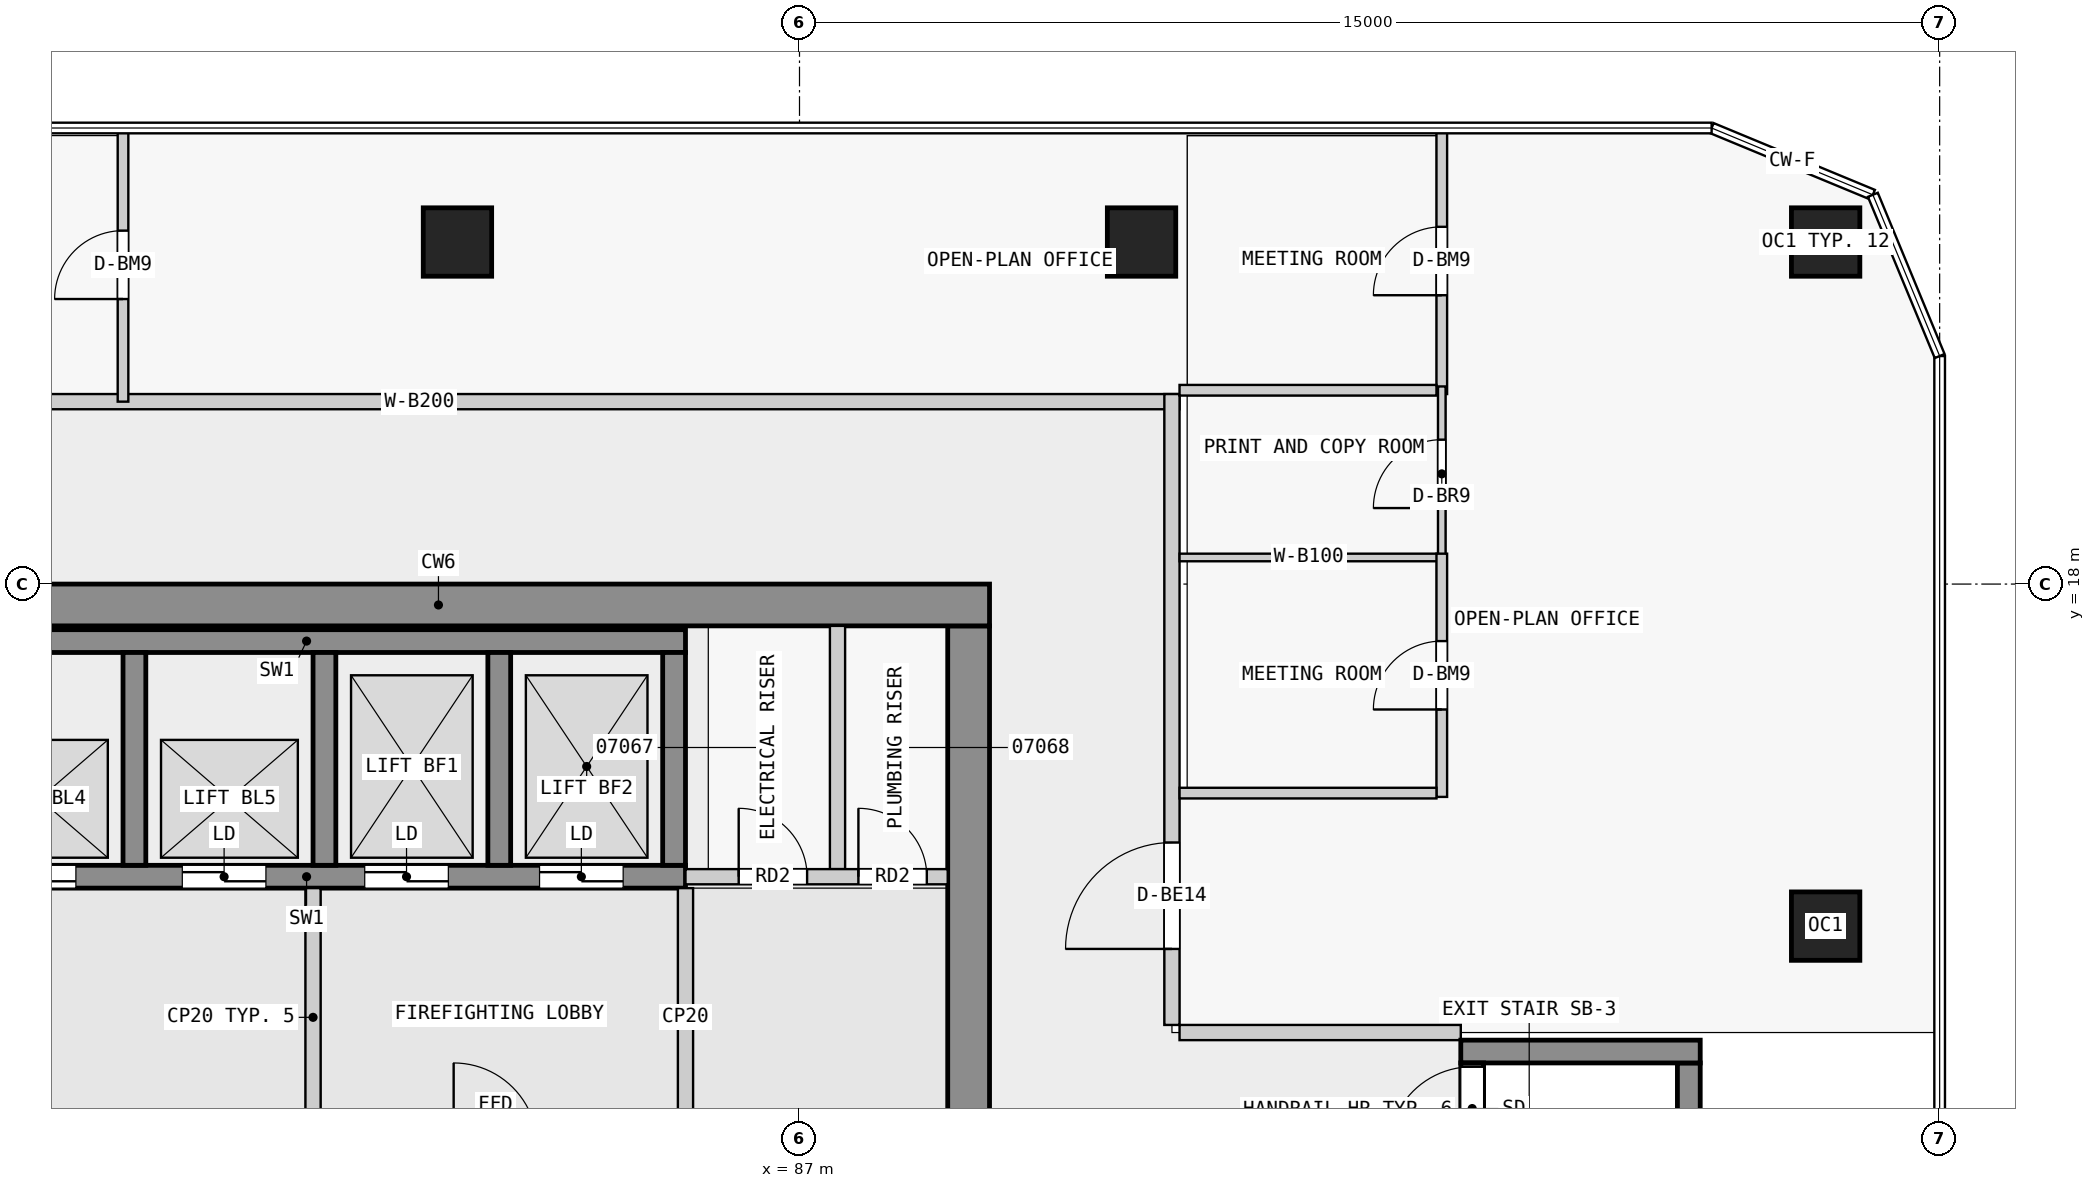
"""IFC4 building model, lengths in metres.
Left out: names, types, materials, properties, quantities, classifications, styles, units other than length and angle.
Written with IfcOpenShell. Run it as: python <this file> out.ifc"""

import sys

from ifc_helpers import new_model, si_unit, direction, frame, frame_2d, origin, origin_2d, place, context, subcontext, project, spatial, rectangle, extrude, element, fill, save


model = new_model("IFC4")
c1 = context("Model", 3, precision=1e-05, world=origin(), true_north=direction((0.0, 1.0)))
c2 = subcontext(c1, "Body", "Model", "MODEL_VIEW")
j1 = project(units=[si_unit("LENGTHUNIT", "METRE"), si_unit("PLANEANGLEUNIT", "RADIAN")], contexts=[c1])
p1 = place(None, origin())
s1 = spatial("IfcSite", under=j1, at=p1, CompositionType="ELEMENT")
p2 = place(p1, origin())
s2 = spatial("IfcBuilding", under=s1, at=p2, CompositionType="ELEMENT")
p3 = place(p2, frame((0.0, 0.0, 33.8)))
s3 = spatial("IfcBuildingStorey", under=s2, at=p3, CompositionType="ELEMENT", Elevation=33.8)
for number, where, z_axis, x_axis in (
    (1, (100.5, 13.5, 0.0), (0.0, 0.0, 1.0), (1.0, 0.0, 0.0)),
    (2, (100.5, 22.5, 0.0), (0.0, 0.0, 1.0), (1.0, 0.0, 0.0)),
    (3, (91.5, 22.5, 0.0), (0.0, 0.0, 1.0), (1.0, 0.0, 0.0)),
    (4, (82.5, 22.5, 0.0), (0.0, 0.0, 1.0), (1.0, 0.0, 0.0)),
):
    element("IfcColumn", number, at=place(p3, frame(where, z_axis=z_axis, x_axis=x_axis)), inside=s3, PredefinedType="COLUMN", context=c2, shape_type="SweptSolid", body=[
        extrude(rectangle(XDim=0.9, YDim=0.9, at=origin_2d()), origin(), (0.0, 0.0, 1.0), 3.5),
    ])
p4 = place(p3, frame((75.0, 17.725, 0.0), z_axis=(0.0, 0.0, 1.0), x_axis=(1.0, 0.0, 0.0)))
e5 = element("IfcWall", 5, at=p4, inside=s3, PredefinedType="SHEAR", context=c2, shape_type="SweptSolid", body=[
    extrude(rectangle(XDim=14.5, YDim=0.55, at=frame_2d((7.25, 0.0))), origin(), (0.0, 0.0, 1.0), 3.25),
])
p5 = place(p3, frame((89.225, 0.55, 0.0), z_axis=(0.0, 0.0, 1.0), x_axis=(0.0, 1.0, 0.0)))
e6 = element("IfcWall", 6, at=p5, inside=s3, PredefinedType="SHEAR", context=c2, shape_type="SweptSolid", body=[
    extrude(rectangle(XDim=16.9, YDim=0.55, at=frame_2d((8.45, 0.0))), origin(), (0.0, 0.0, 1.0), 3.25),
])
p6 = place(p5, frame((7.55, 0.0, 0.0)))
e7 = element("IfcOpeningElement", 7, at=p6, cuts=e6, PredefinedType="OPENING", context=c2, shape_type="SweptSolid", body=[
    extrude(rectangle(XDim=1.8, YDim=2.1, at=frame_2d((0.9, 1.05))), frame((0.0, 0.285, 0.0), z_axis=(0.0, -1.0, 0.0), x_axis=(1.0, 0.0, 0.0)), (0.0, 0.0, 1.0), 0.57),
])
p7 = place(p3, frame((75.53, 17.25, 0.0), z_axis=(0.0, 0.0, 1.0), x_axis=(1.0, 0.0, 0.0)))
e8 = element("IfcWall", 8, at=p7, inside=s3, PredefinedType="SHEAR", context=c2, shape_type="SweptSolid", body=[
    extrude(rectangle(XDim=9.97, YDim=0.3, at=frame_2d((4.985, 0.0))), origin(), (0.0, 0.0, 1.0), 3.25),
])
p8 = place(p3, frame((75.53, 14.15, 0.0), z_axis=(0.0, 0.0, 1.0), x_axis=(1.0, 0.0, 0.0)))
e9 = element("IfcWall", 9, at=p8, inside=s3, PredefinedType="SHEAR", context=c2, shape_type="SweptSolid", body=[
    extrude(rectangle(XDim=9.97, YDim=0.3, at=frame_2d((4.985, 0.0))), origin(), (0.0, 0.0, 1.0), 3.25),
])
p9 = place(p8, frame((0.85, 0.0, 0.0)))
e10 = element("IfcOpeningElement", 10, at=p9, cuts=e9, PredefinedType="OPENING", context=c2, shape_type="SweptSolid", body=[
    extrude(rectangle(XDim=1.1, YDim=2.1, at=frame_2d((0.55, 1.05))), frame((0.0, 0.16, 0.0), z_axis=(0.0, -1.0, 0.0), x_axis=(1.0, 0.0, 0.0)), (0.0, 0.0, 1.0), 0.32),
])
p10 = place(p8, frame((3.35, 0.0, 0.0)))
e11 = element("IfcOpeningElement", 11, at=p10, cuts=e9, PredefinedType="OPENING", context=c2, shape_type="SweptSolid", body=[
    extrude(rectangle(XDim=1.1, YDim=2.1, at=frame_2d((0.55, 1.05))), frame((0.0, 0.16, 0.0), z_axis=(0.0, -1.0, 0.0), x_axis=(1.0, 0.0, 0.0)), (0.0, 0.0, 1.0), 0.32),
])
p11 = place(p8, frame((5.75, 0.0, 0.0)))
e12 = element("IfcOpeningElement", 12, at=p11, cuts=e9, PredefinedType="OPENING", context=c2, shape_type="SweptSolid", body=[
    extrude(rectangle(XDim=1.1, YDim=2.1, at=frame_2d((0.55, 1.05))), frame((0.0, 0.16, 0.0), z_axis=(0.0, -1.0, 0.0), x_axis=(1.0, 0.0, 0.0)), (0.0, 0.0, 1.0), 0.32),
])
p12 = place(p8, frame((8.05, 0.0, 0.0)))
e13 = element("IfcOpeningElement", 13, at=p12, cuts=e9, PredefinedType="OPENING", context=c2, shape_type="SweptSolid", body=[
    extrude(rectangle(XDim=1.1, YDim=2.1, at=frame_2d((0.55, 1.05))), frame((0.0, 0.16, 0.0), z_axis=(0.0, -1.0, 0.0), x_axis=(1.0, 0.0, 0.0)), (0.0, 0.0, 1.0), 0.32),
])
for number, where, z_axis, x_axis in (
    (14, (78.25, 14.3, 0.0), (0.0, 0.0, 1.0), (0.0, 1.0, 0.0)),
    (15, (80.75, 14.3, 0.0), (0.0, 0.0, 1.0), (0.0, 1.0, 0.0)),
    (16, (83.05, 14.3, 0.0), (0.0, 0.0, 1.0), (0.0, 1.0, 0.0)),
    (17, (85.35, 14.3, 0.0), (0.0, 0.0, 1.0), (0.0, 1.0, 0.0)),
):
    element("IfcWall", number, at=place(p3, frame(where, z_axis=z_axis, x_axis=x_axis)), inside=s3, PredefinedType="SHEAR", context=c2, shape_type="SweptSolid", body=[
        extrude(rectangle(XDim=2.8, YDim=0.3, at=frame_2d((1.4, 0.0))), origin(), (0.0, 0.0, 1.0), 3.25),
    ])
p13 = place(p3, frame((95.85, 5.3, 0.0), z_axis=(0.0, 0.0, 1.0), x_axis=(0.0, 1.0, 0.0)))
e18 = element("IfcWall", 18, at=p13, inside=s3, PredefinedType="SHEAR", context=c2, shape_type="SweptSolid", body=[
    extrude(rectangle(XDim=6.4, YDim=0.3, at=frame_2d((3.2, 0.0))), origin(), (0.0, 0.0, 1.0), 3.25),
])
p14 = place(p13, frame((5.25, 0.0, 0.0)))
e19 = element("IfcOpeningElement", 19, at=p14, cuts=e18, PredefinedType="OPENING", context=c2, shape_type="SweptSolid", body=[
    extrude(rectangle(XDim=1.1, YDim=2.1, at=frame_2d((0.55, 1.05))), frame((0.0, 0.16, 0.0), z_axis=(0.0, -1.0, 0.0), x_axis=(1.0, 0.0, 0.0)), (0.0, 0.0, 1.0), 0.32),
])
p15 = place(p3, frame((98.7, 5.3, 0.0), z_axis=(0.0, 0.0, 1.0), x_axis=(0.0, 1.0, 0.0)))
e20 = element("IfcWall", 20, at=p15, inside=s3, PredefinedType="SHEAR", context=c2, shape_type="SweptSolid", body=[
    extrude(rectangle(XDim=6.4, YDim=0.3, at=frame_2d((3.2, 0.0))), origin(), (0.0, 0.0, 1.0), 3.25),
])
p16 = place(p3, frame((95.7, 11.85, 0.0), z_axis=(0.0, 0.0, 1.0), x_axis=(1.0, 0.0, 0.0)))
e21 = element("IfcWall", 21, at=p16, inside=s3, PredefinedType="SHEAR", context=c2, shape_type="SweptSolid", body=[
    extrude(rectangle(XDim=3.15, YDim=0.3, at=frame_2d((1.575, 0.0))), origin(), (0.0, 0.0, 1.0), 3.25),
])
for number, where, z_axis, x_axis in (
    (22, (80.6, 10.6, 0.0), (0.0, 0.0, 1.0), (0.0, 1.0, 0.0)),
    (23, (85.5, 10.6, 0.0), (0.0, 0.0, 1.0), (0.0, 1.0, 0.0)),
):
    element("IfcWall", number, at=place(p3, frame(where, z_axis=z_axis, x_axis=x_axis)), inside=s3, PredefinedType="PARTITIONING", context=c2, shape_type="SweptSolid", body=[
        extrude(rectangle(XDim=3.4, YDim=0.2, at=frame_2d((1.7, 0.0))), origin(), (0.0, 0.0, 1.0), 3.25),
    ])
p17 = place(p3, frame((85.5, 14.15, 0.0), z_axis=(0.0, 0.0, 1.0), x_axis=(1.0, 0.0, 0.0)))
e24 = element("IfcWall", 24, at=p17, inside=s3, PredefinedType="PARTITIONING", context=c2, shape_type="SweptSolid", body=[
    extrude(rectangle(XDim=3.45, YDim=0.2, at=frame_2d((1.725, 0.0))), origin(), (0.0, 0.0, 1.0), 3.25),
])
p18 = place(p17, frame((0.7, 0.0, 0.0)))
e25 = element("IfcOpeningElement", 25, at=p18, cuts=e24, PredefinedType="OPENING", context=c2, shape_type="SweptSolid", body=[
    extrude(rectangle(XDim=0.9, YDim=2.1, at=frame_2d((0.45, 1.05))), frame((0.0, 0.11, 0.0), z_axis=(0.0, -1.0, 0.0), x_axis=(1.0, 0.0, 0.0)), (0.0, 0.0, 1.0), 0.22),
])
p19 = place(p17, frame((2.275, 0.0, 0.0)))
e26 = element("IfcOpeningElement", 26, at=p19, cuts=e24, PredefinedType="OPENING", context=c2, shape_type="SweptSolid", body=[
    extrude(rectangle(XDim=0.9, YDim=2.1, at=frame_2d((0.45, 1.05))), frame((0.0, 0.11, 0.0), z_axis=(0.0, -1.0, 0.0), x_axis=(1.0, 0.0, 0.0)), (0.0, 0.0, 1.0), 0.22),
])
p20 = place(p3, frame((87.5, 14.25, 0.0), z_axis=(0.0, 0.0, 1.0), x_axis=(0.0, 1.0, 0.0)))
e27 = element("IfcWall", 27, at=p20, inside=s3, PredefinedType="PARTITIONING", context=c2, shape_type="SweptSolid", body=[
    extrude(rectangle(XDim=3.2, YDim=0.2, at=frame_2d((1.6, 0.0))), origin(), (0.0, 0.0, 1.0), 3.25),
])
p21 = place(p3, frame((72.0, 20.4, 0.0), z_axis=(0.0, 0.0, 1.0), x_axis=(1.0, 0.0, 0.0)))
e28 = element("IfcWall", 28, at=p21, inside=s3, PredefinedType="PARTITIONING", context=c2, shape_type="SweptSolid", body=[
    extrude(rectangle(XDim=20.0, YDim=0.2, at=frame_2d((10.0, 0.0))), origin(), (0.0, 0.0, 1.0), 3.25),
])
p22 = place(p3, frame((91.9, 12.2, 0.0), z_axis=(0.0, 0.0, 1.0), x_axis=(0.0, 1.0, 0.0)))
e29 = element("IfcWall", 29, at=p22, inside=s3, PredefinedType="PARTITIONING", context=c2, shape_type="SweptSolid", body=[
    extrude(rectangle(XDim=8.3, YDim=0.2, at=frame_2d((4.15, 0.0))), origin(), (0.0, 0.0, 1.0), 3.25),
])
p23 = place(p22, frame((1.0, 0.0, 0.0)))
e30 = element("IfcOpeningElement", 30, at=p23, cuts=e29, PredefinedType="OPENING", context=c2, shape_type="SweptSolid", body=[
    extrude(rectangle(XDim=1.4, YDim=2.4, at=frame_2d((0.7, 1.2))), frame((0.0, 0.11, 0.0), z_axis=(0.0, -1.0, 0.0), x_axis=(1.0, 0.0, 0.0)), (0.0, 0.0, 1.0), 0.22),
])
p24 = place(p3, frame((92.0, 12.1, 0.0), z_axis=(0.0, 0.0, 1.0), x_axis=(1.0, 0.0, 0.0)))
e31 = element("IfcWall", 31, at=p24, inside=s3, PredefinedType="PARTITIONING", context=c2, shape_type="SweptSolid", body=[
    extrude(rectangle(XDim=3.7, YDim=0.2, at=frame_2d((1.85, 0.0))), origin(), (0.0, 0.0, 1.0), 3.25),
])
p25 = place(p3, frame((95.45, 20.5, 0.0), z_axis=(0.0, 0.0, 1.0), x_axis=(0.0, 1.0, 0.0)))
e32 = element("IfcWall", 32, at=p25, inside=s3, PredefinedType="PARTITIONING", context=c2, shape_type="SweptSolid", body=[
    extrude(rectangle(XDim=3.5, YDim=0.14, at=frame_2d((1.75, 0.0))), origin(), (0.0, 0.0, 1.0), 3.25),
])
p26 = place(p25, frame((1.3, 0.0, 0.0)))
e33 = element("IfcOpeningElement", 33, at=p26, cuts=e32, PredefinedType="OPENING", context=c2, shape_type="SweptSolid", body=[
    extrude(rectangle(XDim=0.9, YDim=2.4, at=frame_2d((0.45, 1.2))), frame((0.0, 0.08, 0.0), z_axis=(0.0, -1.0, 0.0), x_axis=(1.0, 0.0, 0.0)), (0.0, 0.0, 1.0), 0.16),
])
p27 = place(p3, frame((92.0, 20.55, 0.0), z_axis=(0.0, 0.0, 1.0), x_axis=(1.0, 0.0, 0.0)))
e34 = element("IfcWall", 34, at=p27, inside=s3, PredefinedType="PARTITIONING", context=c2, shape_type="SweptSolid", body=[
    extrude(rectangle(XDim=3.38, YDim=0.14, at=frame_2d((1.69, 0.0))), origin(), (0.0, 0.0, 1.0), 3.25),
])
p28 = place(p3, frame((95.45, 18.3, 0.0), z_axis=(0.0, 0.0, 1.0), x_axis=(0.0, 1.0, 0.0)))
e35 = element("IfcWall", 35, at=p28, inside=s3, PredefinedType="PARTITIONING", context=c2, shape_type="SweptSolid", body=[
    extrude(rectangle(XDim=2.3, YDim=0.1, at=frame_2d((1.15, 0.0))), origin(), (0.0, 0.0, 1.0), 3.25),
])
p29 = place(p28, frame((0.7, 0.0, 0.0)))
e36 = element("IfcOpeningElement", 36, at=p29, cuts=e35, PredefinedType="OPENING", context=c2, shape_type="SweptSolid", body=[
    extrude(rectangle(XDim=0.9, YDim=2.1, at=frame_2d((0.45, 1.05))), frame((0.0, 0.06, 0.0), z_axis=(0.0, -1.0, 0.0), x_axis=(1.0, 0.0, 0.0)), (0.0, 0.0, 1.0), 0.12),
])
p30 = place(p3, frame((92.0, 18.35, 0.0), z_axis=(0.0, 0.0, 1.0), x_axis=(1.0, 0.0, 0.0)))
e37 = element("IfcWall", 37, at=p30, inside=s3, PredefinedType="PARTITIONING", context=c2, shape_type="SweptSolid", body=[
    extrude(rectangle(XDim=3.4, YDim=0.1, at=frame_2d((1.7, 0.0))), origin(), (0.0, 0.0, 1.0), 3.25),
])
p31 = place(p3, frame((95.45, 15.2, 0.0), z_axis=(0.0, 0.0, 1.0), x_axis=(0.0, 1.0, 0.0)))
e38 = element("IfcWall", 38, at=p31, inside=s3, PredefinedType="PARTITIONING", context=c2, shape_type="SweptSolid", body=[
    extrude(rectangle(XDim=3.2, YDim=0.14, at=frame_2d((1.6, 0.0))), origin(), (0.0, 0.0, 1.0), 3.25),
])
p32 = place(p31, frame((1.15, 0.0, 0.0)))
e39 = element("IfcOpeningElement", 39, at=p32, cuts=e38, PredefinedType="OPENING", context=c2, shape_type="SweptSolid", body=[
    extrude(rectangle(XDim=0.9, YDim=2.4, at=frame_2d((0.45, 1.2))), frame((0.0, 0.08, 0.0), z_axis=(0.0, -1.0, 0.0), x_axis=(1.0, 0.0, 0.0)), (0.0, 0.0, 1.0), 0.16),
])
p33 = place(p3, frame((92.0, 15.25, 0.0), z_axis=(0.0, 0.0, 1.0), x_axis=(1.0, 0.0, 0.0)))
e40 = element("IfcWall", 40, at=p33, inside=s3, PredefinedType="PARTITIONING", context=c2, shape_type="SweptSolid", body=[
    extrude(rectangle(XDim=3.38, YDim=0.14, at=frame_2d((1.69, 0.0))), origin(), (0.0, 0.0, 1.0), 3.25),
])
p34 = place(p3, frame((78.1, 20.4, 0.0), z_axis=(0.0, 0.0, 1.0), x_axis=(0.0, 1.0, 0.0)))
e41 = element("IfcWall", 41, at=p34, inside=s3, PredefinedType="PARTITIONING", context=c2, shape_type="SweptSolid", body=[
    extrude(rectangle(XDim=3.6, YDim=0.14, at=frame_2d((1.8, 0.0))), origin(), (0.0, 0.0, 1.0), 3.25),
])
p35 = place(p34, frame((1.35, 0.0, 0.0)))
e42 = element("IfcOpeningElement", 42, at=p35, cuts=e41, PredefinedType="OPENING", context=c2, shape_type="SweptSolid", body=[
    extrude(rectangle(XDim=0.9, YDim=2.4, at=frame_2d((0.45, 1.2))), frame((0.0, 0.08, 0.0), z_axis=(0.0, -1.0, 0.0), x_axis=(1.0, 0.0, 0.0)), (0.0, 0.0, 1.0), 0.16),
])
p36 = place(p9, origin())
e43 = element("IfcDoor", 43, at=p36, inside=s3, OperationType="DOUBLE_DOOR_SLIDING", PredefinedType="DOOR", context=c2, shape_type="SweptSolid", body=[
    extrude(rectangle(XDim=1.1, YDim=2.1, at=frame_2d((0.55, 1.05))), frame((0.0, 0.025, 0.0), z_axis=(0.0, -1.0, 0.0), x_axis=(1.0, 0.0, 0.0)), (0.0, 0.0, 1.0), 0.05),
])
fill(e10, e43)
p37 = place(p10, origin())
e44 = element("IfcDoor", 44, at=p37, inside=s3, OperationType="DOUBLE_DOOR_SLIDING", PredefinedType="DOOR", context=c2, shape_type="SweptSolid", body=[
    extrude(rectangle(XDim=1.1, YDim=2.1, at=frame_2d((0.55, 1.05))), frame((0.0, 0.025, 0.0), z_axis=(0.0, -1.0, 0.0), x_axis=(1.0, 0.0, 0.0)), (0.0, 0.0, 1.0), 0.05),
])
fill(e11, e44)
p38 = place(p11, origin())
e45 = element("IfcDoor", 45, at=p38, inside=s3, OperationType="DOUBLE_DOOR_SLIDING", PredefinedType="DOOR", context=c2, shape_type="SweptSolid", body=[
    extrude(rectangle(XDim=1.1, YDim=2.1, at=frame_2d((0.55, 1.05))), frame((0.0, 0.025, 0.0), z_axis=(0.0, -1.0, 0.0), x_axis=(1.0, 0.0, 0.0)), (0.0, 0.0, 1.0), 0.05),
])
fill(e12, e45)
p39 = place(p12, origin())
e46 = element("IfcDoor", 46, at=p39, inside=s3, OperationType="DOUBLE_DOOR_SLIDING", PredefinedType="DOOR", context=c2, shape_type="SweptSolid", body=[
    extrude(rectangle(XDim=1.1, YDim=2.1, at=frame_2d((0.55, 1.05))), frame((0.0, 0.025, 0.0), z_axis=(0.0, -1.0, 0.0), x_axis=(1.0, 0.0, 0.0)), (0.0, 0.0, 1.0), 0.05),
])
fill(e13, e46)
p40 = place(p14, origin())
e47 = element("IfcDoor", 47, at=p40, inside=s3, OperationType="SINGLE_SWING_LEFT", PredefinedType="DOOR", context=c2, shape_type="SweptSolid", body=[
    extrude(rectangle(XDim=1.1, YDim=2.1, at=frame_2d((0.55, 1.05))), frame((0.0, 0.025, 0.0), z_axis=(0.0, -1.0, 0.0), x_axis=(1.0, 0.0, 0.0)), (0.0, 0.0, 1.0), 0.05),
])
fill(e19, e47)
p41 = place(p18, origin())
e48 = element("IfcDoor", 48, at=p41, inside=s3, OperationType="SINGLE_SWING_LEFT", PredefinedType="DOOR", context=c2, shape_type="SweptSolid", body=[
    extrude(rectangle(XDim=0.9, YDim=2.1, at=frame_2d((0.45, 1.05))), frame((0.0, 0.025, 0.0), z_axis=(0.0, -1.0, 0.0), x_axis=(1.0, 0.0, 0.0)), (0.0, 0.0, 1.0), 0.05),
])
fill(e25, e48)
p42 = place(p19, origin())
e49 = element("IfcDoor", 49, at=p42, inside=s3, OperationType="SINGLE_SWING_LEFT", PredefinedType="DOOR", context=c2, shape_type="SweptSolid", body=[
    extrude(rectangle(XDim=0.9, YDim=2.1, at=frame_2d((0.45, 1.05))), frame((0.0, 0.025, 0.0), z_axis=(0.0, -1.0, 0.0), x_axis=(1.0, 0.0, 0.0)), (0.0, 0.0, 1.0), 0.05),
])
fill(e26, e49)
p43 = place(p23, origin())
e50 = element("IfcDoor", 50, at=p43, inside=s3, OperationType="DOUBLE_DOOR_SINGLE_SWING", PredefinedType="DOOR", context=c2, shape_type="SweptSolid", body=[
    extrude(rectangle(XDim=1.4, YDim=2.4, at=frame_2d((0.7, 1.2))), frame((0.0, 0.025, 0.0), z_axis=(0.0, -1.0, 0.0), x_axis=(1.0, 0.0, 0.0)), (0.0, 0.0, 1.0), 0.05),
])
fill(e30, e50)
p44 = place(p26, origin())
e51 = element("IfcDoor", 51, at=p44, inside=s3, OperationType="SINGLE_SWING_LEFT", PredefinedType="DOOR", context=c2, shape_type="SweptSolid", body=[
    extrude(rectangle(XDim=0.9, YDim=2.4, at=frame_2d((0.45, 1.2))), frame((0.0, 0.025, 0.0), z_axis=(0.0, -1.0, 0.0), x_axis=(1.0, 0.0, 0.0)), (0.0, 0.0, 1.0), 0.05),
])
fill(e33, e51)
p45 = place(p29, origin())
e52 = element("IfcDoor", 52, at=p45, inside=s3, OperationType="SINGLE_SWING_LEFT", PredefinedType="DOOR", context=c2, shape_type="SweptSolid", body=[
    extrude(rectangle(XDim=0.9, YDim=2.1, at=frame_2d((0.45, 1.05))), frame((0.0, 0.025, 0.0), z_axis=(0.0, -1.0, 0.0), x_axis=(1.0, 0.0, 0.0)), (0.0, 0.0, 1.0), 0.05),
])
fill(e36, e52)
p46 = place(p32, origin())
e53 = element("IfcDoor", 53, at=p46, inside=s3, OperationType="SINGLE_SWING_LEFT", PredefinedType="DOOR", context=c2, shape_type="SweptSolid", body=[
    extrude(rectangle(XDim=0.9, YDim=2.4, at=frame_2d((0.45, 1.2))), frame((0.0, 0.025, 0.0), z_axis=(0.0, -1.0, 0.0), x_axis=(1.0, 0.0, 0.0)), (0.0, 0.0, 1.0), 0.05),
])
fill(e39, e53)
p47 = place(p35, origin())
e54 = element("IfcDoor", 54, at=p47, inside=s3, OperationType="SINGLE_SWING_LEFT", PredefinedType="DOOR", context=c2, shape_type="SweptSolid", body=[
    extrude(rectangle(XDim=0.9, YDim=2.4, at=frame_2d((0.45, 1.2))), frame((0.0, 0.025, 0.0), z_axis=(0.0, -1.0, 0.0), x_axis=(1.0, 0.0, 0.0)), (0.0, 0.0, 1.0), 0.05),
])
fill(e42, e54)
save(model, sys.argv[1])
